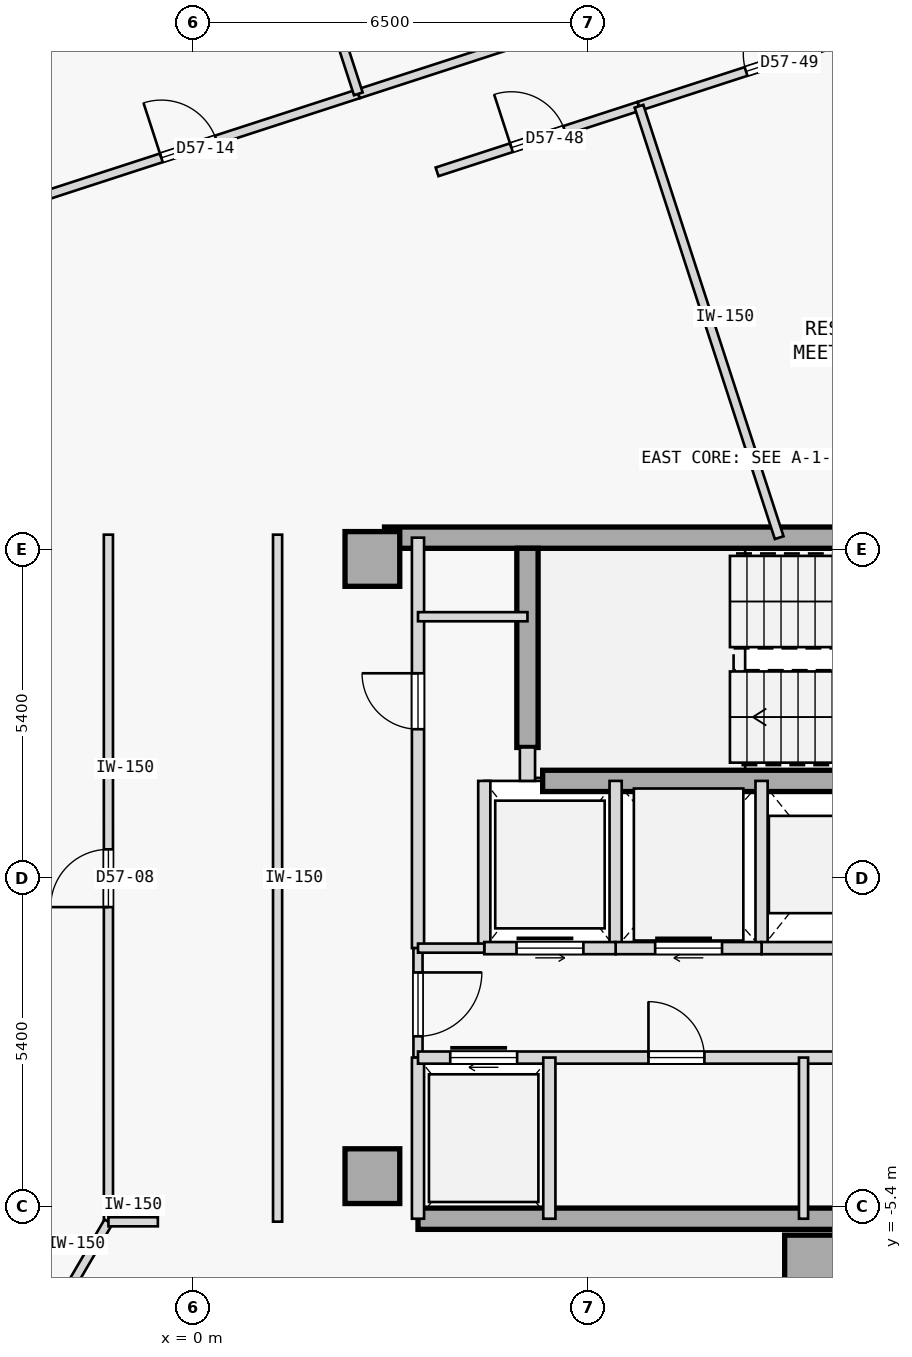
"""IFC4 building model, lengths in metres.
Left out: names, types, materials, properties, quantities, classifications, styles, units other than length and angle.
Written with IfcOpenShell. Run it as: python <this file> out.ifc"""

import sys

from ifc_helpers import new_model, si_unit, direction, frame, frame_2d, origin, origin_2d, place, context, subcontext, project, spatial, rectangle, extrude, element, fill, save


model = new_model("IFC4")
c1 = context("Model", 3, precision=1e-05, world=origin(), true_north=direction((0.0, 1.0)))
c2 = subcontext(c1, "Body", "Model", "MODEL_VIEW")
j1 = project(units=[si_unit("LENGTHUNIT", "METRE"), si_unit("PLANEANGLEUNIT", "RADIAN")], contexts=[c1])
p1 = place(None, origin())
s1 = spatial("IfcSite", under=j1, at=p1, CompositionType="ELEMENT")
p2 = place(p1, origin())
s2 = spatial("IfcBuilding", under=s1, at=p2, CompositionType="ELEMENT")
p3 = place(p2, frame((0.0, 0.0, 217.6)))
s3 = spatial("IfcBuildingStorey", under=s2, at=p3, CompositionType="ELEMENT", Elevation=217.6)
for number, where, z_axis, x_axis in (
    (1, (10.18, -6.32, 0.0), (0.0, 0.0, 1.0), (1.0, 0.0, 0.0)),
    (2, (2.95, -4.9, 0.0), (0.0, 0.0, 1.0), (1.0, 0.0, 0.0)),
    (3, (2.95, 5.25, 0.0), (0.0, 0.0, 1.0), (1.0, 0.0, 0.0)),
):
    element("IfcColumn", number, at=place(p3, frame(where, z_axis=z_axis, x_axis=x_axis)), inside=s3, PredefinedType="COLUMN", context=c2, shape_type="SweptSolid", body=[
        extrude(rectangle(XDim=0.9, YDim=0.9, at=origin_2d()), origin(), (0.0, 0.0, 1.0), 3.35),
    ])
p4 = place(p3, frame((3.15, 5.6, 0.0), z_axis=(0.0, 0.0, 1.0), x_axis=(1.0, 0.0, 0.0)))
e4 = element("IfcWall", 4, at=p4, inside=s3, PredefinedType="SHEAR", context=c2, shape_type="SweptSolid", body=[
    extrude(rectangle(XDim=11.41, YDim=0.35, at=frame_2d((5.705, 0.0))), origin(), (0.0, 0.0, 1.0), 3.125),
])
p5 = place(p3, frame((3.7, -5.6, 0.0), z_axis=(0.0, 0.0, 1.0), x_axis=(1.0, 0.0, 0.0)))
e5 = element("IfcWall", 5, at=p5, inside=s3, PredefinedType="SHEAR", context=c2, shape_type="SweptSolid", body=[
    extrude(rectangle(XDim=10.86, YDim=0.35, at=frame_2d((5.43, 0.0))), origin(), (0.0, 0.0, 1.0), 3.125),
])
p6 = place(p3, frame((5.5, 2.15, 0.0), z_axis=(0.0, 0.0, 1.0), x_axis=(0.0, 1.0, 0.0)))
e6 = element("IfcWall", 6, at=p6, inside=s3, PredefinedType="SHEAR", context=c2, shape_type="SweptSolid", body=[
    extrude(rectangle(XDim=3.275, YDim=0.35, at=frame_2d((1.638, 0.0))), origin(), (0.0, 0.0, 1.0), 3.125),
])
p7 = place(p3, frame((5.75, 1.6, 0.0), z_axis=(0.0, 0.0, 1.0), x_axis=(1.0, 0.0, 0.0)))
e7 = element("IfcWall", 7, at=p7, inside=s3, PredefinedType="SHEAR", context=c2, shape_type="SweptSolid", body=[
    extrude(rectangle(XDim=5.15, YDim=0.35, at=frame_2d((2.575, 0.0))), origin(), (0.0, 0.0, 1.0), 3.125),
])
p8 = place(p3, frame((5.5, 1.6, 0.0), z_axis=(0.0, 0.0, 1.0), x_axis=(0.0, 1.0, 0.0)))
e8 = element("IfcWall", 8, at=p8, inside=s3, PredefinedType="STANDARD", context=c2, shape_type="SweptSolid", body=[
    extrude(rectangle(XDim=0.55, YDim=0.25, at=frame_2d((0.275, 0.0))), origin(), (0.0, 0.0, 1.0), 3.125),
])
p9 = place(p3, frame((3.7, -1.15, 0.0), z_axis=(0.0, 0.0, 1.0), x_axis=(0.0, 1.0, 0.0)))
e9 = element("IfcWall", 9, at=p9, inside=s3, PredefinedType="STANDARD", context=c2, shape_type="SweptSolid", body=[
    extrude(rectangle(XDim=6.75, YDim=0.2, at=frame_2d((3.375, 0.0))), origin(), (0.0, 0.0, 1.0), 3.125),
])
p10 = place(p9, frame((3.6, 0.0, 0.0)))
e10 = element("IfcOpeningElement", 10, at=p10, cuts=e9, PredefinedType="OPENING", context=c2, shape_type="SweptSolid", body=[
    extrude(rectangle(XDim=0.92, YDim=2.15, at=frame_2d((0.46, 1.075))), frame((0.0, 0.11, 0.0), z_axis=(0.0, -1.0, 0.0), x_axis=(1.0, 0.0, 0.0)), (0.0, 0.0, 1.0), 0.22),
])
p11 = place(p3, frame((3.7, -2.95, 0.0), z_axis=(0.0, 0.0, 1.0), x_axis=(0.0, 1.0, 0.0)))
e11 = element("IfcWall", 11, at=p11, inside=s3, PredefinedType="PARTITIONING", context=c2, shape_type="SweptSolid", body=[
    extrude(rectangle(XDim=1.8, YDim=0.15, at=frame_2d((0.9, 0.0))), origin(), (0.0, 0.0, 1.0), 3.125),
])
p12 = place(p11, frame((0.35, 0.0, 0.0)))
e12 = element("IfcOpeningElement", 12, at=p12, cuts=e11, PredefinedType="OPENING", context=c2, shape_type="SweptSolid", body=[
    extrude(rectangle(XDim=1.05, YDim=2.18, at=frame_2d((0.525, 1.09))), frame((0.0, 0.085, 0.0), z_axis=(0.0, -1.0, 0.0), x_axis=(1.0, 0.0, 0.0)), (0.0, 0.0, 1.0), 0.17),
])
p13 = place(p3, frame((3.7, -5.6, 0.0), z_axis=(0.0, 0.0, 1.0), x_axis=(0.0, 1.0, 0.0)))
e13 = element("IfcWall", 13, at=p13, inside=s3, PredefinedType="STANDARD", context=c2, shape_type="SweptSolid", body=[
    extrude(rectangle(XDim=2.65, YDim=0.2, at=frame_2d((1.325, 0.0))), origin(), (0.0, 0.0, 1.0), 3.125),
])
p14 = place(p3, frame((9.35, -1.15, 0.0), z_axis=(0.0, 0.0, 1.0), x_axis=(0.0, 1.0, 0.0)))
e14 = element("IfcWall", 14, at=p14, inside=s3, PredefinedType="STANDARD", context=c2, shape_type="SweptSolid", body=[
    extrude(rectangle(XDim=2.75, YDim=0.2, at=frame_2d((1.375, 0.0))), origin(), (0.0, 0.0, 1.0), 3.125),
])
p15 = place(p3, frame((9.35, -1.15, 0.0), z_axis=(0.0, 0.0, 1.0), x_axis=(1.0, 0.0, 0.0)))
e15 = element("IfcWall", 15, at=p15, inside=s3, PredefinedType="STANDARD", context=c2, shape_type="SweptSolid", body=[
    extrude(rectangle(XDim=2.2, YDim=0.2, at=frame_2d((1.1, 0.0))), origin(), (0.0, 0.0, 1.0), 3.125),
])
p16 = place(p3, frame((6.95, -1.15, 0.0), z_axis=(0.0, 0.0, 1.0), x_axis=(0.0, 1.0, 0.0)))
e16 = element("IfcWall", 16, at=p16, inside=s3, PredefinedType="STANDARD", context=c2, shape_type="SweptSolid", body=[
    extrude(rectangle(XDim=2.75, YDim=0.2, at=frame_2d((1.375, 0.0))), origin(), (0.0, 0.0, 1.0), 3.125),
])
p17 = place(p3, frame((6.95, -1.15, 0.0), z_axis=(0.0, 0.0, 1.0), x_axis=(1.0, 0.0, 0.0)))
e17 = element("IfcWall", 17, at=p17, inside=s3, PredefinedType="STANDARD", context=c2, shape_type="SweptSolid", body=[
    extrude(rectangle(XDim=2.4, YDim=0.2, at=frame_2d((1.2, 0.0))), origin(), (0.0, 0.0, 1.0), 3.125),
])
p18 = place(p17, frame((0.65, 0.0, 0.0)))
e18 = element("IfcOpeningElement", 18, at=p18, cuts=e17, PredefinedType="OPENING", context=c2, shape_type="SweptSolid", body=[
    extrude(rectangle(XDim=1.1, YDim=2.15, at=frame_2d((0.55, 1.075))), frame((0.0, 0.11, 0.0), z_axis=(0.0, -1.0, 0.0), x_axis=(1.0, 0.0, 0.0)), (0.0, 0.0, 1.0), 0.22),
])
p19 = place(p3, frame((4.79, -1.15, 0.0), z_axis=(0.0, 0.0, 1.0), x_axis=(0.0, 1.0, 0.0)))
e19 = element("IfcWall", 19, at=p19, inside=s3, PredefinedType="STANDARD", context=c2, shape_type="SweptSolid", body=[
    extrude(rectangle(XDim=2.75, YDim=0.2, at=frame_2d((1.375, 0.0))), origin(), (0.0, 0.0, 1.0), 3.125),
])
p20 = place(p3, frame((4.79, -1.15, 0.0), z_axis=(0.0, 0.0, 1.0), x_axis=(1.0, 0.0, 0.0)))
e20 = element("IfcWall", 20, at=p20, inside=s3, PredefinedType="STANDARD", context=c2, shape_type="SweptSolid", body=[
    extrude(rectangle(XDim=2.16, YDim=0.2, at=frame_2d((1.08, 0.0))), origin(), (0.0, 0.0, 1.0), 3.125),
])
p21 = place(p20, frame((0.53, 0.0, 0.0)))
e21 = element("IfcOpeningElement", 21, at=p21, cuts=e20, PredefinedType="OPENING", context=c2, shape_type="SweptSolid", body=[
    extrude(rectangle(XDim=1.1, YDim=2.15, at=frame_2d((0.55, 1.075))), frame((0.0, 0.11, 0.0), z_axis=(0.0, -1.0, 0.0), x_axis=(1.0, 0.0, 0.0)), (0.0, 0.0, 1.0), 0.22),
])
p22 = place(p3, frame((3.7, -1.15, 0.0), z_axis=(0.0, 0.0, 1.0), x_axis=(1.0, 0.0, 0.0)))
e22 = element("IfcWall", 22, at=p22, inside=s3, PredefinedType="PARTITIONING", context=c2, shape_type="SweptSolid", body=[
    extrude(rectangle(XDim=1.09, YDim=0.15, at=frame_2d((0.545, 0.0))), origin(), (0.0, 0.0, 1.0), 3.125),
])
p23 = place(p3, frame((3.7, -2.95, 0.0), z_axis=(0.0, 0.0, 1.0), x_axis=(1.0, 0.0, 0.0)))
e23 = element("IfcWall", 23, at=p23, inside=s3, PredefinedType="STANDARD", context=c2, shape_type="SweptSolid", body=[
    extrude(rectangle(XDim=10.8, YDim=0.2, at=frame_2d((5.4, 0.0))), origin(), (0.0, 0.0, 1.0), 3.125),
])
p24 = place(p23, frame((0.53, 0.0, 0.0)))
e24 = element("IfcOpeningElement", 24, at=p24, cuts=e23, PredefinedType="OPENING", context=c2, shape_type="SweptSolid", body=[
    extrude(rectangle(XDim=1.1, YDim=2.15, at=frame_2d((0.55, 1.075))), frame((0.0, 0.11, 0.0), z_axis=(0.0, -1.0, 0.0), x_axis=(1.0, 0.0, 0.0)), (0.0, 0.0, 1.0), 0.22),
])
p25 = place(p23, frame((3.79, 0.0, 0.0)))
e25 = element("IfcOpeningElement", 25, at=p25, cuts=e23, PredefinedType="OPENING", context=c2, shape_type="SweptSolid", body=[
    extrude(rectangle(XDim=0.92, YDim=2.15, at=frame_2d((0.46, 1.075))), frame((0.0, 0.11, 0.0), z_axis=(0.0, -1.0, 0.0), x_axis=(1.0, 0.0, 0.0)), (0.0, 0.0, 1.0), 0.22),
])
p26 = place(p23, frame((8.11, 0.0, 0.0)))
e26 = element("IfcOpeningElement", 26, at=p26, cuts=e23, PredefinedType="OPENING", context=c2, shape_type="SweptSolid", body=[
    extrude(rectangle(XDim=0.92, YDim=2.15, at=frame_2d((0.46, 1.075))), frame((0.0, 0.11, 0.0), z_axis=(0.0, -1.0, 0.0), x_axis=(1.0, 0.0, 0.0)), (0.0, 0.0, 1.0), 0.22),
])
p27 = place(p3, frame((5.86, -5.6, 0.0), z_axis=(0.0, 0.0, 1.0), x_axis=(0.0, 1.0, 0.0)))
e27 = element("IfcWall", 27, at=p27, inside=s3, PredefinedType="STANDARD", context=c2, shape_type="SweptSolid", body=[
    extrude(rectangle(XDim=2.65, YDim=0.2, at=frame_2d((1.325, 0.0))), origin(), (0.0, 0.0, 1.0), 3.125),
])
p28 = place(p3, frame((10.04, -5.6, 0.0), z_axis=(0.0, 0.0, 1.0), x_axis=(0.0, 1.0, 0.0)))
e28 = element("IfcWall", 28, at=p28, inside=s3, PredefinedType="PARTITIONING", context=c2, shape_type="SweptSolid", body=[
    extrude(rectangle(XDim=2.65, YDim=0.15, at=frame_2d((1.325, 0.0))), origin(), (0.0, 0.0, 1.0), 3.125),
])
p29 = place(p3, frame((3.7, 4.3, 0.0), z_axis=(0.0, 0.0, 1.0), x_axis=(1.0, 0.0, 0.0)))
e29 = element("IfcWall", 29, at=p29, inside=s3, PredefinedType="PARTITIONING", context=c2, shape_type="SweptSolid", body=[
    extrude(rectangle(XDim=1.8, YDim=0.15, at=frame_2d((0.9, 0.0))), origin(), (0.0, 0.0, 1.0), 3.125),
])
p30 = place(p3, frame((-1.391, -5.65, 0.0), z_axis=(0.0, 0.0, 1.0), x_axis=(-8.6422954e-05, 0.999999996266, 0.0)))
e30 = element("IfcWall", 30, at=p30, inside=s3, PredefinedType="PARTITIONING", context=c2, shape_type="SweptSolid", body=[
    extrude(rectangle(XDim=11.3, YDim=0.15, at=frame_2d((5.65, 0.0))), origin(), (0.0, 0.0, 1.0), 3.125),
])
p31 = place(p30, frame((5.175, 0.0, 0.0)))
e31 = element("IfcOpeningElement", 31, at=p31, cuts=e30, PredefinedType="OPENING", context=c2, shape_type="SweptSolid", body=[
    extrude(rectangle(XDim=0.95, YDim=2.15, at=frame_2d((0.475, 1.075))), frame((0.0, 0.085, 0.0), z_axis=(0.0, -1.0, 0.0), x_axis=(1.0, 0.0, 0.0)), (0.0, 0.0, 1.0), 0.17),
])
p32 = place(p3, frame((1.391, -5.648, 0.0), z_axis=(0.0, 0.0, 1.0), x_axis=(-4.3218947e-05, 0.999999999066, 0.0)))
e32 = element("IfcWall", 32, at=p32, inside=s3, PredefinedType="PARTITIONING", context=c2, shape_type="SweptSolid", body=[
    extrude(rectangle(XDim=11.298, YDim=0.15, at=frame_2d((5.649, 0.0))), origin(), (0.0, 0.0, 1.0), 3.125),
])
p33 = place(p3, frame((-2.856, 11.087, 0.0), z_axis=(0.0, 0.0, 1.0), x_axis=(0.95106314138, 0.308996603718, 0.0)))
e33 = element("IfcWall", 33, at=p33, inside=s3, PredefinedType="PARTITIONING", context=c2, shape_type="SweptSolid", body=[
    extrude(rectangle(XDim=5.862, YDim=0.15, at=frame_2d((2.931, 0.0))), origin(), (0.0, 0.0, 1.0), 3.125),
])
p34 = place(p33, frame((2.456, 0.0, 0.0)))
e34 = element("IfcOpeningElement", 34, at=p34, cuts=e33, PredefinedType="OPENING", context=c2, shape_type="SweptSolid", body=[
    extrude(rectangle(XDim=0.95, YDim=2.15, at=frame_2d((0.475, 1.075))), frame((0.0, 0.085, 0.0), z_axis=(0.0, -1.0, 0.0), x_axis=(1.0, 0.0, 0.0)), (0.0, 0.0, 1.0), 0.17),
])
p35 = place(p3, frame((2.719, 12.898, 0.0), z_axis=(0.0, 0.0, 1.0), x_axis=(0.951053341802, 0.309026764289, 0.0)))
e35 = element("IfcWall", 35, at=p35, inside=s3, PredefinedType="PARTITIONING", context=c2, shape_type="SweptSolid", body=[
    extrude(rectangle(XDim=4.654, YDim=0.15, at=frame_2d((2.327, 0.0))), origin(), (0.0, 0.0, 1.0), 3.125),
])
p36 = place(p3, frame((-1.98, -6.659, 0.0), z_axis=(0.0, 0.0, 1.0), x_axis=(0.504533622976, 0.863392044952, 0.0)))
e36 = element("IfcWall", 36, at=p36, inside=s3, PredefinedType="PARTITIONING", context=c2, shape_type="SweptSolid", body=[
    extrude(rectangle(XDim=1.168, YDim=0.15, at=frame_2d((0.584, 0.0))), origin(), (0.0, 0.0, 1.0), 3.125),
])
p37 = place(p3, frame((4.013, 11.616, 0.0), z_axis=(0.0, 0.0, 1.0), x_axis=(0.951054104561, 0.309024416831, 0.0)))
e37 = element("IfcWall", 37, at=p37, inside=s3, PredefinedType="PARTITIONING", context=c2, shape_type="SweptSolid", body=[
    extrude(rectangle(XDim=3.492, YDim=0.15, at=frame_2d((1.746, 0.0))), origin(), (0.0, 0.0, 1.0), 3.125),
])
p38 = place(p37, frame((1.286, 0.0, 0.0)))
e38 = element("IfcOpeningElement", 38, at=p38, cuts=e37, PredefinedType="OPENING", context=c2, shape_type="SweptSolid", body=[
    extrude(rectangle(XDim=0.92, YDim=2.15, at=frame_2d((0.46, 1.075))), frame((0.0, 0.085, 0.0), z_axis=(0.0, -1.0, 0.0), x_axis=(1.0, 0.0, 0.0)), (0.0, 0.0, 1.0), 0.17),
])
p39 = place(p3, frame((7.334, 12.695, 0.0), z_axis=(0.0, 0.0, 1.0), x_axis=(0.951043772533, 0.30905621289, 0.0)))
e39 = element("IfcWall", 39, at=p39, inside=s3, PredefinedType="PARTITIONING", context=c2, shape_type="SweptSolid", body=[
    extrude(rectangle(XDim=4.622, YDim=0.15, at=frame_2d((2.311, 0.0))), origin(), (0.0, 0.0, 1.0), 3.125),
])
p40 = place(p39, frame((1.851, 0.0, 0.0)))
e40 = element("IfcOpeningElement", 40, at=p40, cuts=e39, PredefinedType="OPENING", context=c2, shape_type="SweptSolid", body=[
    extrude(rectangle(XDim=0.92, YDim=2.15, at=frame_2d((0.46, 1.075))), frame((0.0, 0.085, 0.0), z_axis=(0.0, -1.0, 0.0), x_axis=(1.0, 0.0, 0.0)), (0.0, 0.0, 1.0), 0.17),
])
p41 = place(p3, frame((-1.391, -5.65, 0.0), z_axis=(0.0, 0.0, 1.0), x_axis=(0.999999954883, 0.000300390494, 0.0)))
e41 = element("IfcWall", 41, at=p41, inside=s3, PredefinedType="PARTITIONING", context=c2, shape_type="SweptSolid", body=[
    extrude(rectangle(XDim=0.813, YDim=0.15, at=frame_2d((0.406, 0.0))), origin(), (0.0, 0.0, 1.0), 3.125),
])
p42 = place(p3, frame((2.719, 12.898, 0.0), z_axis=(0.0, 0.0, 1.0), x_axis=(-0.308998913866, 0.951062390819, 0.0)))
e42 = element("IfcWall", 42, at=p42, inside=s3, PredefinedType="PARTITIONING", context=c2, shape_type="SweptSolid", body=[
    extrude(rectangle(XDim=7.284, YDim=0.15, at=frame_2d((3.642, 0.0))), origin(), (0.0, 0.0, 1.0), 3.125),
])
p43 = place(p3, frame((9.64, 5.6, 0.0), z_axis=(0.0, 0.0, 1.0), x_axis=(-0.309012069377, 0.95105811651, 0.0)))
e43 = element("IfcWall", 43, at=p43, inside=s3, PredefinedType="PARTITIONING", context=c2, shape_type="SweptSolid", body=[
    extrude(rectangle(XDim=7.46, YDim=0.15, at=frame_2d((3.73, 0.0))), origin(), (0.0, 0.0, 1.0), 3.125),
])
p44 = place(p12, frame((1.05, 0.0, 0.0), z_axis=(0.0, 0.0, 1.0), x_axis=(-1.0, 0.0, 0.0)))
e44 = element("IfcDoor", 44, at=p44, inside=s3, OperationType="SINGLE_SWING_RIGHT", PredefinedType="DOOR", context=c2, shape_type="SweptSolid", body=[
    extrude(rectangle(XDim=1.05, YDim=2.18, at=frame_2d((0.525, 1.09))), frame((0.0, 0.025, 0.0), z_axis=(0.0, -1.0, 0.0), x_axis=(1.0, 0.0, 0.0)), (0.0, 0.0, 1.0), 0.05),
])
fill(e12, e44)
p45 = place(p18, origin())
e45 = element("IfcDoor", 45, at=p45, inside=s3, OperationType="SLIDING_TO_RIGHT", PredefinedType="DOOR", context=c2, shape_type="SweptSolid", body=[
    extrude(rectangle(XDim=1.1, YDim=2.15, at=frame_2d((0.55, 1.075))), frame((0.0, 0.025, 0.0), z_axis=(0.0, -1.0, 0.0), x_axis=(1.0, 0.0, 0.0)), (0.0, 0.0, 1.0), 0.05),
])
fill(e18, e45)
p46 = place(p21, origin())
e46 = element("IfcDoor", 46, at=p46, inside=s3, OperationType="SLIDING_TO_LEFT", PredefinedType="DOOR", context=c2, shape_type="SweptSolid", body=[
    extrude(rectangle(XDim=1.1, YDim=2.15, at=frame_2d((0.55, 1.075))), frame((0.0, 0.025, 0.0), z_axis=(0.0, -1.0, 0.0), x_axis=(1.0, 0.0, 0.0)), (0.0, 0.0, 1.0), 0.05),
])
fill(e21, e46)
p47 = place(p24, origin())
e47 = element("IfcDoor", 47, at=p47, inside=s3, OperationType="SLIDING_TO_RIGHT", PredefinedType="DOOR", context=c2, shape_type="SweptSolid", body=[
    extrude(rectangle(XDim=1.1, YDim=2.15, at=frame_2d((0.55, 1.075))), frame((0.0, 0.025, 0.0), z_axis=(0.0, -1.0, 0.0), x_axis=(1.0, 0.0, 0.0)), (0.0, 0.0, 1.0), 0.05),
])
fill(e24, e47)
p48 = place(p25, origin())
e48 = element("IfcDoor", 48, at=p48, inside=s3, OperationType="SINGLE_SWING_LEFT", PredefinedType="DOOR", context=c2, shape_type="SweptSolid", body=[
    extrude(rectangle(XDim=0.92, YDim=2.15, at=frame_2d((0.46, 1.075))), frame((0.0, 0.025, 0.0), z_axis=(0.0, -1.0, 0.0), x_axis=(1.0, 0.0, 0.0)), (0.0, 0.0, 1.0), 0.05),
])
fill(e25, e48)
p49 = place(p10, origin())
e49 = element("IfcDoor", 49, at=p49, inside=s3, OperationType="SINGLE_SWING_RIGHT", PredefinedType="DOOR", context=c2, shape_type="SweptSolid", body=[
    extrude(rectangle(XDim=0.92, YDim=2.15, at=frame_2d((0.46, 1.075))), frame((0.0, 0.025, 0.0), z_axis=(0.0, -1.0, 0.0), x_axis=(1.0, 0.0, 0.0)), (0.0, 0.0, 1.0), 0.05),
])
fill(e10, e49)
p50 = place(p31, origin())
e50 = element("IfcDoor", 50, at=p50, inside=s3, OperationType="SINGLE_SWING_LEFT", PredefinedType="DOOR", context=c2, shape_type="SweptSolid", body=[
    extrude(rectangle(XDim=0.95, YDim=2.15, at=frame_2d((0.475, 1.075))), frame((0.0, 0.025, 0.0), z_axis=(0.0, -1.0, 0.0), x_axis=(1.0, 0.0, 0.0)), (0.0, 0.0, 1.0), 0.05),
])
fill(e31, e50)
p51 = place(p34, origin())
e51 = element("IfcDoor", 51, at=p51, inside=s3, OperationType="SINGLE_SWING_LEFT", PredefinedType="DOOR", context=c2, shape_type="SweptSolid", body=[
    extrude(rectangle(XDim=0.95, YDim=2.15, at=frame_2d((0.475, 1.075))), frame((0.0, 0.025, 0.0), z_axis=(0.0, -1.0, 0.0), x_axis=(1.0, 0.0, 0.0)), (0.0, 0.0, 1.0), 0.05),
])
fill(e34, e51)
p52 = place(p38, origin())
e52 = element("IfcDoor", 52, at=p52, inside=s3, OperationType="SINGLE_SWING_LEFT", PredefinedType="DOOR", context=c2, shape_type="SweptSolid", body=[
    extrude(rectangle(XDim=0.92, YDim=2.15, at=frame_2d((0.46, 1.075))), frame((0.0, 0.025, 0.0), z_axis=(0.0, -1.0, 0.0), x_axis=(1.0, 0.0, 0.0)), (0.0, 0.0, 1.0), 0.05),
])
fill(e38, e52)
p53 = place(p40, origin())
e53 = element("IfcDoor", 53, at=p53, inside=s3, OperationType="SINGLE_SWING_RIGHT", PredefinedType="DOOR", context=c2, shape_type="SweptSolid", body=[
    extrude(rectangle(XDim=0.92, YDim=2.15, at=frame_2d((0.46, 1.075))), frame((0.0, 0.025, 0.0), z_axis=(0.0, -1.0, 0.0), x_axis=(1.0, 0.0, 0.0)), (0.0, 0.0, 1.0), 0.05),
])
fill(e40, e53)
save(model, sys.argv[1])
